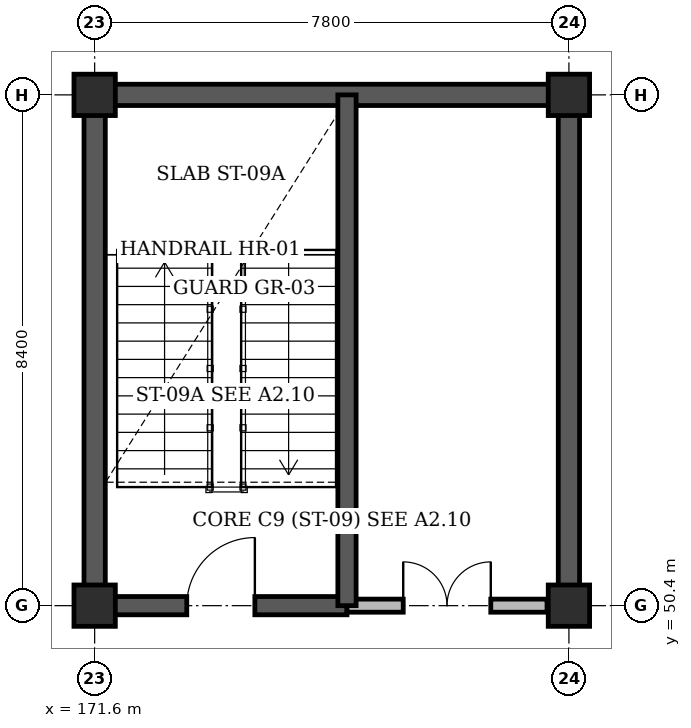
"""IFC4 building model, lengths in metres.
Left out: names, types, materials, properties, quantities, classifications, styles, units other than length and angle.
Written with IfcOpenShell. Run it as: python <this file> out.ifc"""

import sys

from ifc_helpers import new_model, si_unit, direction, frame, frame_2d, origin, origin_2d, place, context, subcontext, project, spatial, rectangle, extrude, element, fill, save


model = new_model("IFC4")
c1 = context("Model", 3, precision=1e-05, world=origin(), true_north=direction((0.0, 1.0)))
c2 = subcontext(c1, "Body", "Model", "MODEL_VIEW")
j1 = project(units=[si_unit("LENGTHUNIT", "METRE"), si_unit("PLANEANGLEUNIT", "RADIAN")], contexts=[c1])
p1 = place(None, origin())
s1 = spatial("IfcSite", under=j1, at=p1, CompositionType="ELEMENT")
p2 = place(p1, origin())
s2 = spatial("IfcBuilding", under=s1, at=p2, CompositionType="ELEMENT")
p3 = place(p2, frame((0.0, 0.0, 4.8)))
s3 = spatial("IfcBuildingStorey", under=s2, at=p3, CompositionType="ELEMENT", Elevation=4.8)
p4 = place(p3, frame((171.425, 58.8, 0.0), z_axis=(0.0, 0.0, 1.0), x_axis=(1.0, 0.0, 0.0)))
e1 = element("IfcWall", 1, at=p4, inside=s3, PredefinedType="SHEAR", context=c2, shape_type="SweptSolid", body=[
    extrude(rectangle(XDim=8.15, YDim=0.35, at=frame_2d((4.075, 0.0))), origin(), (0.0, 0.0, 1.0), 4.48),
])
for number, where, z_axis, x_axis in (
    (2, (171.6, 50.4, 0.0), (0.0, 0.0, 1.0), (0.0, 1.0, 0.0)),
    (3, (179.4, 50.4, 0.0), (0.0, 0.0, 1.0), (0.0, 1.0, 0.0)),
):
    element("IfcWall", number, at=place(p3, frame(where, z_axis=z_axis, x_axis=x_axis)), inside=s3, PredefinedType="SHEAR", context=c2, shape_type="SweptSolid", body=[
        extrude(rectangle(XDim=8.4, YDim=0.35, at=frame_2d((4.2, 0.0))), origin(), (0.0, 0.0, 1.0), 4.48),
    ])
for number, where, z_axis, x_axis in (
    (4, (171.6, 50.4, 0.0), (0.0, 0.0, 1.0), (1.0, 0.0, 0.0)),
    (5, (171.6, 58.8, 0.0), (0.0, 0.0, 1.0), (1.0, 0.0, 0.0)),
    (6, (179.4, 50.4, 0.0), (0.0, 0.0, 1.0), (1.0, 0.0, 0.0)),
    (7, (179.4, 58.8, 0.0), (0.0, 0.0, 1.0), (1.0, 0.0, 0.0)),
):
    element("IfcColumn", number, at=place(p3, frame(where, z_axis=z_axis, x_axis=x_axis)), inside=s3, PredefinedType="COLUMN", context=c2, shape_type="SweptSolid", body=[
        extrude(rectangle(XDim=0.68, YDim=0.68, at=origin_2d()), origin(), (0.0, 0.0, 1.0), 4.8),
    ])
p5 = place(p3, frame((171.6, 50.4, 0.0), z_axis=(0.0, 0.0, 1.0), x_axis=(1.0, 0.0, 0.0)))
e8 = element("IfcWall", 8, at=p5, inside=s3, PredefinedType="SHEAR", context=c2, shape_type="SweptSolid", body=[
    extrude(rectangle(XDim=4.15, YDim=0.3, at=frame_2d((2.075, 0.0))), origin(), (0.0, 0.0, 1.0), 4.8),
])
p6 = place(p5, frame((1.515, 0.0, 0.0)))
e9 = element("IfcOpeningElement", 9, at=p6, cuts=e8, PredefinedType="OPENING", context=c2, shape_type="SweptSolid", body=[
    extrude(rectangle(XDim=1.12, YDim=2.15, at=frame_2d((0.56, 1.075))), frame((0.0, 0.16, 0.0), z_axis=(0.0, -1.0, 0.0), x_axis=(1.0, 0.0, 0.0)), (0.0, 0.0, 1.0), 0.32),
])
p7 = place(p3, frame((175.75, 50.4, 0.0), z_axis=(0.0, 0.0, 1.0), x_axis=(1.0, 0.0, 0.0)))
e10 = element("IfcWall", 10, at=p7, inside=s3, PredefinedType="STANDARD", context=c2, shape_type="SweptSolid", body=[
    extrude(rectangle(XDim=3.29, YDim=0.215, at=frame_2d((1.645, 0.0))), origin(), (0.0, 0.0, 1.0), 3.68),
])
p8 = place(p7, frame((0.925, 0.0, 0.0)))
e11 = element("IfcOpeningElement", 11, at=p8, cuts=e10, PredefinedType="OPENING", context=c2, shape_type="SweptSolid", body=[
    extrude(rectangle(XDim=1.44, YDim=2.2, at=frame_2d((0.72, 1.1))), frame((0.0, 0.118, 0.0), z_axis=(0.0, -1.0, 0.0), x_axis=(1.0, 0.0, 0.0)), (0.0, 0.0, 1.0), 0.235),
])
p9 = place(p3, frame((175.75, 50.4, 0.0), z_axis=(0.0, 0.0, 1.0), x_axis=(0.0, 1.0, 0.0)))
e12 = element("IfcWall", 12, at=p9, inside=s3, PredefinedType="SHEAR", context=c2, shape_type="SweptSolid", body=[
    extrude(rectangle(XDim=8.4, YDim=0.3, at=frame_2d((4.2, 0.0))), origin(), (0.0, 0.0, 1.0), 4.8),
])
p10 = place(p6, origin())
e13 = element("IfcDoor", 13, at=p10, inside=s3, OperationType="SINGLE_SWING_RIGHT", PredefinedType="DOOR", context=c2, shape_type="SweptSolid", body=[
    extrude(rectangle(XDim=1.12, YDim=2.15, at=frame_2d((0.56, 1.075))), frame((0.0, 0.025, 0.0), z_axis=(0.0, -1.0, 0.0), x_axis=(1.0, 0.0, 0.0)), (0.0, 0.0, 1.0), 0.05),
])
fill(e9, e13)
p11 = place(p8, origin())
e14 = element("IfcDoor", 14, at=p11, inside=s3, OperationType="DOUBLE_DOOR_SINGLE_SWING", PredefinedType="DOOR", context=c2, shape_type="SweptSolid", body=[
    extrude(rectangle(XDim=1.44, YDim=2.2, at=frame_2d((0.72, 1.1))), frame((0.0, 0.025, 0.0), z_axis=(0.0, -1.0, 0.0), x_axis=(1.0, 0.0, 0.0)), (0.0, 0.0, 1.0), 0.05),
])
fill(e11, e14)
save(model, sys.argv[1])
